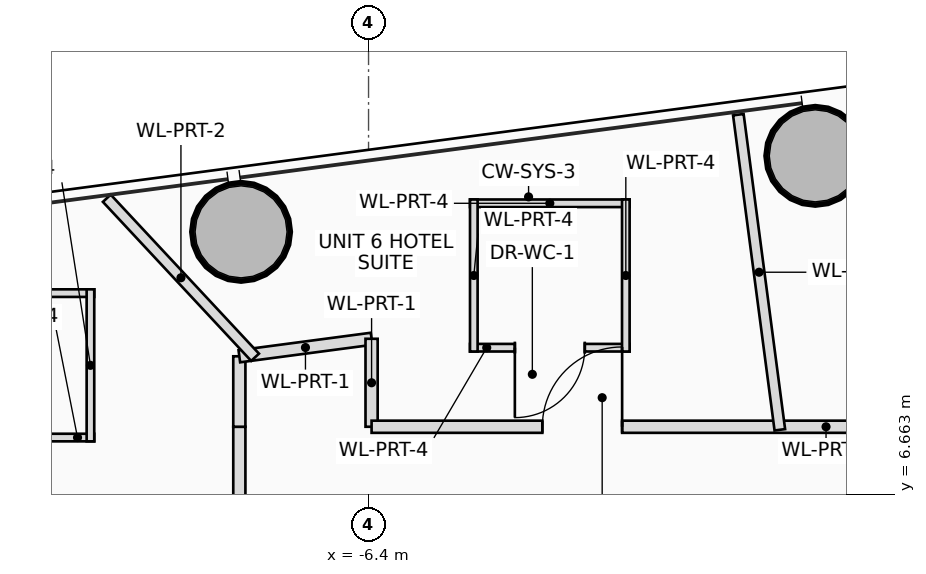
"""IFC4 building model, lengths in metres.
Left out: names, types, materials, properties, quantities, classifications, styles, units other than length and angle.
Written with IfcOpenShell. Run it as: python <this file> out.ifc"""

import sys

from ifc_helpers import new_model, si_unit, direction, frame, frame_2d, origin, origin_2d, place, context, subcontext, project, spatial, rectangle, hollow_circle, extrude, source, transform, mapped, element, fill, save


model = new_model("IFC4")
c1 = context("Model", 3, precision=1e-05, world=origin(), true_north=direction((0.0, 1.0)))
c2 = subcontext(c1, "Body", "Model", "MODEL_VIEW")
j1 = project(units=[si_unit("LENGTHUNIT", "METRE"), si_unit("PLANEANGLEUNIT", "RADIAN")], contexts=[c1])
p1 = place(None, origin())
s1 = spatial("IfcSite", under=j1, at=p1, CompositionType="ELEMENT")
p2 = place(p1, origin())
s2 = spatial("IfcBuilding", under=s1, at=p2, CompositionType="ELEMENT")
p3 = place(p2, frame((0.0, 0.0, 176.0)))
s3 = spatial("IfcBuildingStorey", under=s2, at=p3, CompositionType="ELEMENT", Elevation=176.0)
m1 = source(origin(), c2, "Body", "SweptSolid", [
    extrude(hollow_circle(Radius=0.65, WallThickness=0.045, at=origin_2d()), origin(), (0.0, 0.0, 1.0), 3.45),
])
for number, where, z_axis, x_axis in (
    (1, (-0.522, 11.114, 0.0), (0.0, 0.0, 1.0), (1.0, 0.0, 0.0)),
    (2, (-8.077, 10.114, 0.0), (0.0, 0.0, 1.0), (1.0, 0.0, 0.0)),
):
    element("IfcColumn", number, at=place(p3, frame(where, z_axis=z_axis, x_axis=x_axis)), inside=s3, PredefinedType="COLUMN", context=c2, shape_type="MappedRepresentation", body=[
        mapped(m1, transform((0.0, 0.0, 0.0), scale=1.0)),
    ])
p4 = place(p3, frame((-5.065, 10.49, 0.0), z_axis=(0.0, 0.0, 1.0), x_axis=(1.0, 0.0, 0.0)))
e3 = element("IfcWall", 3, at=p4, inside=s3, PredefinedType="PARTITIONING", context=c2, shape_type="SweptSolid", body=[
    extrude(rectangle(XDim=2.1, YDim=0.1, at=frame_2d((1.05, 0.0))), origin(), (0.0, 0.0, 1.0), 2.765),
])
p5 = place(p3, frame((-2.965, 8.59, 0.0), z_axis=(0.0, 0.0, 1.0), x_axis=(-1.0, 0.0, 0.0)))
e4 = element("IfcWall", 4, at=p5, inside=s3, PredefinedType="PARTITIONING", context=c2, shape_type="SweptSolid", body=[
    extrude(rectangle(XDim=2.1, YDim=0.1, at=frame_2d((1.05, 0.0))), origin(), (0.0, 0.0, 1.0), 2.605),
])
p6 = place(p5, frame((0.59, 0.0, 0.0)))
e5 = element("IfcOpeningElement", 5, at=p6, cuts=e4, PredefinedType="OPENING", context=c2, shape_type="SweptSolid", body=[
    extrude(rectangle(XDim=0.92, YDim=2.1, at=frame_2d((0.46, 1.05))), frame((0.0, 0.06, 0.0), z_axis=(0.0, -1.0, 0.0), x_axis=(1.0, 0.0, 0.0)), (0.0, 0.0, 1.0), 0.12),
])
p7 = place(p3, frame((-3.015, 10.54, 0.0), z_axis=(0.0, 0.0, 1.0), x_axis=(0.0, -1.0, 0.0)))
e6 = element("IfcWall", 6, at=p7, inside=s3, PredefinedType="PARTITIONING", context=c2, shape_type="SweptSolid", body=[
    extrude(rectangle(XDim=2.0, YDim=0.1, at=frame_2d((1.0, 0.0))), origin(), (0.0, 0.0, 1.0), 2.605),
])
p8 = place(p3, frame((-5.015, 8.54, 0.0), z_axis=(0.0, 0.0, 1.0), x_axis=(0.0, 1.0, 0.0)))
e7 = element("IfcWall", 7, at=p8, inside=s3, PredefinedType="PARTITIONING", context=c2, shape_type="SweptSolid", body=[
    extrude(rectangle(XDim=2.0, YDim=0.1, at=frame_2d((1.0, 0.0))), origin(), (0.0, 0.0, 1.0), 2.765),
])
p9 = place(p3, frame((-12.109, 9.308, 0.0), z_axis=(0.0, 0.0, 1.0), x_axis=(1.0, 0.0, 0.0)))
e8 = element("IfcWall", 8, at=p9, inside=s3, PredefinedType="PARTITIONING", context=c2, shape_type="SweptSolid", body=[
    extrude(rectangle(XDim=2.1, YDim=0.1, at=frame_2d((1.05, 0.0))), origin(), (0.0, 0.0, 1.0), 3.25),
])
p10 = place(p3, frame((-10.009, 7.408, 0.0), z_axis=(0.0, 0.0, 1.0), x_axis=(-1.0, 0.0, 0.0)))
e9 = element("IfcWall", 9, at=p10, inside=s3, PredefinedType="PARTITIONING", context=c2, shape_type="SweptSolid", body=[
    extrude(rectangle(XDim=2.1, YDim=0.1, at=frame_2d((1.05, 0.0))), origin(), (0.0, 0.0, 1.0), 2.605),
])
p11 = place(p10, frame((0.59, 0.0, 0.0)))
e10 = element("IfcOpeningElement", 10, at=p11, cuts=e9, PredefinedType="OPENING", context=c2, shape_type="SweptSolid", body=[
    extrude(rectangle(XDim=0.92, YDim=2.1, at=frame_2d((0.46, 1.05))), frame((0.0, 0.06, 0.0), z_axis=(0.0, -1.0, 0.0), x_axis=(1.0, 0.0, 0.0)), (0.0, 0.0, 1.0), 0.12),
])
p12 = place(p3, frame((-10.059, 9.358, 0.0), z_axis=(0.0, 0.0, 1.0), x_axis=(0.0, -1.0, 0.0)))
e11 = element("IfcWall", 11, at=p12, inside=s3, PredefinedType="PARTITIONING", context=c2, shape_type="SweptSolid", body=[
    extrude(rectangle(XDim=2.0, YDim=0.1, at=frame_2d((1.0, 0.0))), origin(), (0.0, 0.0, 1.0), 2.805),
])
p13 = place(p3, frame((-8.1, -7.528, 0.0), z_axis=(0.0, 0.0, 1.0), x_axis=(0.0, 1.0, 0.0)))
e12 = element("IfcWall", 12, at=p13, inside=s3, PredefinedType="PARTITIONING", context=c2, shape_type="SweptSolid", body=[
    extrude(rectangle(XDim=15.078, YDim=0.16, at=frame_2d((7.539, 0.0))), origin(), (0.0, 0.0, 1.0), 2.605),
])
p14 = place(p13, frame((3.265, 0.0, 0.0)))
e13 = element("IfcOpeningElement", 13, at=p14, cuts=e12, PredefinedType="OPENING", context=c2, shape_type="SweptSolid", body=[
    extrude(rectangle(XDim=0.9, YDim=2.05, at=frame_2d((0.45, 1.025))), frame((0.0, 0.09, 0.0), z_axis=(0.0, -1.0, 0.0), x_axis=(1.0, 0.0, 0.0)), (0.0, 0.0, 1.0), 0.18),
])
p15 = place(p13, frame((9.079, 0.0, 0.0)))
e14 = element("IfcOpeningElement", 14, at=p15, cuts=e12, PredefinedType="OPENING", context=c2, shape_type="SweptSolid", body=[
    extrude(rectangle(XDim=1.05, YDim=2.2, at=frame_2d((0.525, 1.1))), frame((0.0, 0.09, 0.0), z_axis=(0.0, -1.0, 0.0), x_axis=(1.0, 0.0, 0.0)), (0.0, 0.0, 1.0), 0.18),
])
p16 = place(p13, frame((12.91, 0.0, 0.0)))
e15 = element("IfcOpeningElement", 15, at=p16, cuts=e12, PredefinedType="OPENING", context=c2, shape_type="SweptSolid", body=[
    extrude(rectangle(XDim=1.05, YDim=2.2, at=frame_2d((0.525, 1.1))), frame((0.0, 0.09, 0.0), z_axis=(0.0, -1.0, 0.0), x_axis=(1.0, 0.0, 0.0)), (0.0, 0.0, 1.0), 0.18),
])
p17 = place(p3, frame((-8.1, 7.55, 0.0), z_axis=(0.0, 0.0, 1.0), x_axis=(0.0, 1.0, 0.0)))
e16 = element("IfcWall", 16, at=p17, inside=s3, PredefinedType="PARTITIONING", context=c2, shape_type="SweptSolid", body=[
    extrude(rectangle(XDim=0.927, YDim=0.16, at=frame_2d((0.463, 0.0))), origin(), (0.0, 0.0, 1.0), 2.805),
])
p18 = place(p3, frame((-8.1, 8.477, 0.0), z_axis=(0.0, 0.0, 1.0), x_axis=(0.991341723558, 0.131307224223, 0.0)))
e17 = element("IfcWall", 17, at=p18, inside=s3, PredefinedType="PARTITIONING", context=c2, shape_type="SweptSolid", body=[
    extrude(rectangle(XDim=1.755, YDim=0.16, at=frame_2d((0.877, 0.0))), origin(), (0.0, 0.0, 1.0), 2.605),
])
p19 = place(p3, frame((-6.36, 8.708, 0.0), z_axis=(0.0, 0.0, 1.0), x_axis=(0.0, -1.0, 0.0)))
e18 = element("IfcWall", 18, at=p19, inside=s3, PredefinedType="PARTITIONING", context=c2, shape_type="SweptSolid", body=[
    extrude(rectangle(XDim=1.157, YDim=0.16, at=frame_2d((0.579, 0.0))), origin(), (0.0, 0.0, 1.0), 2.805),
])
p20 = place(p3, frame((-6.36, 7.55, 0.0), z_axis=(0.0, 0.0, 1.0), x_axis=(1.0, 0.0, 0.0)))
e19 = element("IfcWall", 19, at=p20, inside=s3, PredefinedType="PARTITIONING", context=c2, shape_type="SweptSolid", body=[
    extrude(rectangle(XDim=11.61, YDim=0.16, at=frame_2d((5.805, 0.0))), origin(), (0.0, 0.0, 1.0), 2.605),
])
p21 = place(p20, frame((2.246, 0.0, 0.0)))
e20 = element("IfcOpeningElement", 20, at=p21, cuts=e19, PredefinedType="OPENING", context=c2, shape_type="SweptSolid", body=[
    extrude(rectangle(XDim=1.05, YDim=2.2, at=frame_2d((0.525, 1.1))), frame((0.0, 0.09, 0.0), z_axis=(0.0, -1.0, 0.0), x_axis=(1.0, 0.0, 0.0)), (0.0, 0.0, 1.0), 0.18),
])
p22 = place(p20, frame((8.662, 0.0, 0.0)))
e21 = element("IfcOpeningElement", 21, at=p22, cuts=e19, PredefinedType="OPENING", context=c2, shape_type="SweptSolid", body=[
    extrude(rectangle(XDim=1.0, YDim=2.25, at=frame_2d((0.5, 1.125))), frame((0.0, 0.09, 0.0), z_axis=(0.0, -1.0, 0.0), x_axis=(1.0, 0.0, 0.0)), (0.0, 0.0, 1.0), 0.18),
])
p23 = place(p3, frame((-0.989, 7.51, 0.0), z_axis=(0.0, 0.0, 1.0), x_axis=(-0.130484717168, 0.991450320785, 0.0)))
e22 = element("IfcWall", 22, at=p23, inside=s3, PredefinedType="PARTITIONING", context=c2, shape_type="SweptSolid", body=[
    extrude(rectangle(XDim=4.182, YDim=0.14, at=frame_2d((2.091, 0.0))), origin(), (0.0, 0.0, 1.0), 2.605),
])
p24 = place(p3, frame((-7.893, 8.464, 0.0), z_axis=(0.0, 0.0, 1.0), x_axis=(-0.682011061147, 0.73134185746, 0.0)))
e23 = element("IfcWall", 23, at=p24, inside=s3, PredefinedType="PARTITIONING", context=c2, shape_type="SweptSolid", body=[
    extrude(rectangle(XDim=2.861, YDim=0.14, at=frame_2d((1.43, 0.0))), origin(), (0.0, 0.0, 1.0), 2.765),
])
p25 = place(p3, frame((-8.06, 4.376, 0.0), z_axis=(0.0, 0.0, 1.0), x_axis=(-0.878817054271, 0.477158867802, 0.0)))
e24 = element("IfcWall", 24, at=p25, inside=s3, PredefinedType="PARTITIONING", context=c2, shape_type="SweptSolid", body=[
    extrude(rectangle(XDim=10.774, YDim=0.14, at=frame_2d((5.387, 0.0))), origin(), (0.0, 0.0, 1.0), 2.605),
])
p26 = place(p6, origin())
e25 = element("IfcDoor", 25, at=p26, inside=s3, OperationType="SINGLE_SWING_RIGHT", PredefinedType="DOOR", context=c2, shape_type="SweptSolid", body=[
    extrude(rectangle(XDim=0.92, YDim=2.1, at=frame_2d((0.46, 1.05))), frame((0.0, 0.025, 0.0), z_axis=(0.0, -1.0, 0.0), x_axis=(1.0, 0.0, 0.0)), (0.0, 0.0, 1.0), 0.05),
])
fill(e5, e25)
p27 = place(p21, origin())
e26 = element("IfcDoor", 26, at=p27, inside=s3, OperationType="SINGLE_SWING_RIGHT", PredefinedType="DOOR", context=c2, shape_type="SweptSolid", body=[
    extrude(rectangle(XDim=1.05, YDim=2.2, at=frame_2d((0.525, 1.1))), frame((0.0, 0.025, 0.0), z_axis=(0.0, -1.0, 0.0), x_axis=(1.0, 0.0, 0.0)), (0.0, 0.0, 1.0), 0.05),
])
fill(e20, e26)
save(model, sys.argv[1])
